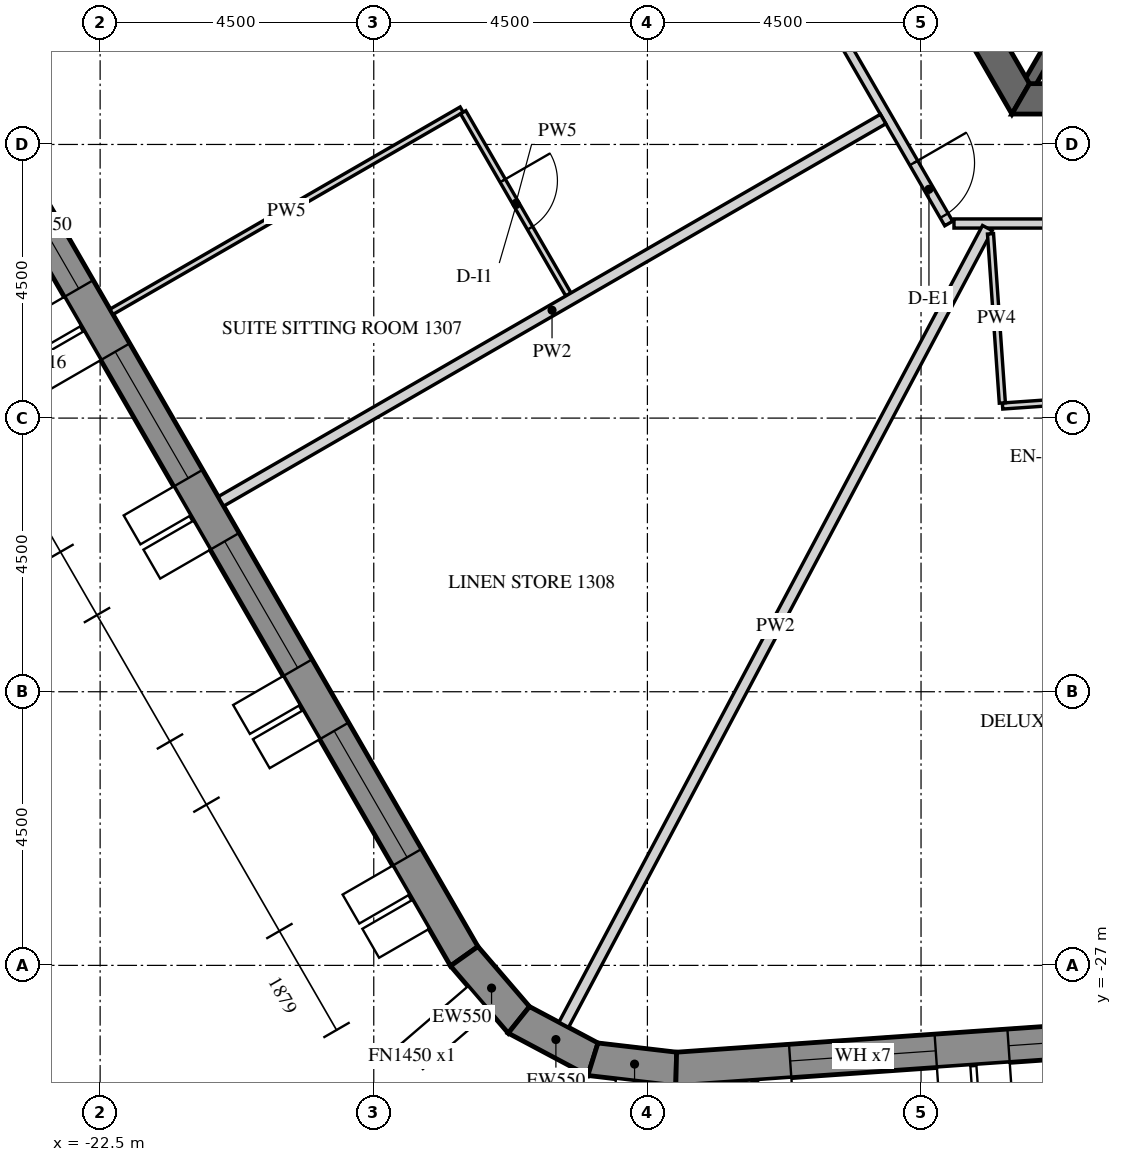
"""IFC4 building model, lengths in metres.
Left out: names, types, materials, properties, quantities, classifications, styles, units other than length and angle.
Written with IfcOpenShell. Run it as: python <this file> out.ifc"""

import sys

from ifc_helpers import new_model, si_unit, direction, frame, frame_2d, origin, place, context, subcontext, project, spatial, polyline, rectangle, outline, extrude, element, fill, save


model = new_model("IFC4")
c1 = context("Model", 3, precision=1e-05, world=origin(), true_north=direction((0.0, 1.0)))
c2 = subcontext(c1, "Body", "Model", "MODEL_VIEW")
j1 = project(units=[si_unit("LENGTHUNIT", "METRE"), si_unit("PLANEANGLEUNIT", "RADIAN")], contexts=[c1])
p1 = place(None, origin())
s1 = spatial("IfcSite", under=j1, at=p1, CompositionType="ELEMENT")
p2 = place(p1, origin())
s2 = spatial("IfcBuilding", under=s1, at=p2, CompositionType="ELEMENT")
p3 = place(p2, frame((0.0, 0.0, 176.1)))
s3 = spatial("IfcBuildingStorey", under=s2, at=p3, CompositionType="ELEMENT", Elevation=176.1)
p4 = place(p3, frame((-30.391, -2.811, -0.15), z_axis=(0.0, 0.0, 1.0), x_axis=(0.499998569178, -0.866026229868, 0.0)))
e1 = element("IfcWall", 1, at=p4, inside=s3, PredefinedType="SOLIDWALL", context=c2, shape_type="SweptSolid", body=[
    extrude(outline(polyline([(-0.022, -0.275), (27.783, -0.275), (27.732, 0.275), (0.022, 0.275), (-0.022, -0.275)])), origin(), (0.0, 0.0, 1.0), 3.9),
])
p5 = place(p4, frame((1.879, 0.0, 1.05)))
e2 = element("IfcOpeningElement", 2, at=p5, cuts=e1, PredefinedType="OPENING", context=c2, shape_type="SweptSolid", body=[
    extrude(rectangle(XDim=2.4, YDim=2.4, at=frame_2d((1.2, 1.2))), frame((0.0, 0.285, 0.0), z_axis=(0.0, -1.0, 0.0), x_axis=(1.0, 0.0, 0.0)), (0.0, 0.0, 1.0), 0.57),
])
p6 = place(p4, frame((5.479, 0.0, 1.05)))
e3 = element("IfcOpeningElement", 3, at=p6, cuts=e1, PredefinedType="OPENING", context=c2, shape_type="SweptSolid", body=[
    extrude(rectangle(XDim=2.4, YDim=2.4, at=frame_2d((1.2, 1.2))), frame((0.0, 0.285, 0.0), z_axis=(0.0, -1.0, 0.0), x_axis=(1.0, 0.0, 0.0)), (0.0, 0.0, 1.0), 0.57),
])
p7 = place(p4, frame((9.079, 0.0, 1.05)))
e4 = element("IfcOpeningElement", 4, at=p7, cuts=e1, PredefinedType="OPENING", context=c2, shape_type="SweptSolid", body=[
    extrude(rectangle(XDim=2.4, YDim=2.4, at=frame_2d((1.2, 1.2))), frame((0.0, 0.285, 0.0), z_axis=(0.0, -1.0, 0.0), x_axis=(1.0, 0.0, 0.0)), (0.0, 0.0, 1.0), 0.57),
])
p8 = place(p4, frame((12.679, 0.0, 1.05)))
e5 = element("IfcOpeningElement", 5, at=p8, cuts=e1, PredefinedType="OPENING", context=c2, shape_type="SweptSolid", body=[
    extrude(rectangle(XDim=2.4, YDim=2.4, at=frame_2d((1.2, 1.2))), frame((0.0, 0.285, 0.0), z_axis=(0.0, -1.0, 0.0), x_axis=(1.0, 0.0, 0.0)), (0.0, 0.0, 1.0), 0.57),
])
p9 = place(p4, frame((16.279, 0.0, 1.05)))
e6 = element("IfcOpeningElement", 6, at=p9, cuts=e1, PredefinedType="OPENING", context=c2, shape_type="SweptSolid", body=[
    extrude(rectangle(XDim=2.4, YDim=2.4, at=frame_2d((1.2, 1.2))), frame((0.0, 0.285, 0.0), z_axis=(0.0, -1.0, 0.0), x_axis=(1.0, 0.0, 0.0)), (0.0, 0.0, 1.0), 0.57),
])
p10 = place(p4, frame((19.879, 0.0, 1.05)))
e7 = element("IfcOpeningElement", 7, at=p10, cuts=e1, PredefinedType="OPENING", context=c2, shape_type="SweptSolid", body=[
    extrude(rectangle(XDim=2.4, YDim=2.4, at=frame_2d((1.2, 1.2))), frame((0.0, 0.285, 0.0), z_axis=(0.0, -1.0, 0.0), x_axis=(1.0, 0.0, 0.0)), (0.0, 0.0, 1.0), 0.57),
])
p11 = place(p4, frame((23.479, 0.0, 1.05)))
e8 = element("IfcOpeningElement", 8, at=p11, cuts=e1, PredefinedType="OPENING", context=c2, shape_type="SweptSolid", body=[
    extrude(rectangle(XDim=2.4, YDim=2.4, at=frame_2d((1.2, 1.2))), frame((0.0, 0.285, 0.0), z_axis=(0.0, -1.0, 0.0), x_axis=(1.0, 0.0, 0.0)), (0.0, 0.0, 1.0), 0.57),
])
p12 = place(p3, frame((-16.512, -26.85, -0.15), z_axis=(0.0, 0.0, 1.0), x_axis=(0.651621950847, -0.758543890078, 0.0)))
e9 = element("IfcWall", 9, at=p12, inside=s3, PredefinedType="SOLIDWALL", context=c2, shape_type="SweptSolid", body=[
    extrude(outline(polyline([(-0.026, -0.275), (1.431, -0.275), (1.327, 0.275), (0.026, 0.275), (-0.026, -0.275)])), origin(), (0.0, 0.0, 1.0), 3.9),
])
p13 = place(p3, frame((-15.614, -27.896, -0.15), z_axis=(0.0, 0.0, 1.0), x_axis=(0.882994189209, -0.469383917304, 0.0)))
e10 = element("IfcWall", 10, at=p13, inside=s3, PredefinedType="SOLIDWALL", context=c2, shape_type="SweptSolid", body=[
    extrude(outline(polyline([(-0.052, -0.275), (1.431, -0.275), (1.327, 0.275), (0.052, 0.275), (-0.052, -0.275)])), origin(), (0.0, 0.0, 1.0), 3.9),
])
p14 = place(p3, frame((-14.396, -28.543, -0.15), z_axis=(0.0, 0.0, 1.0), x_axis=(0.993232537394, -0.11614269956, 0.0)))
e11 = element("IfcWall", 11, at=p14, inside=s3, PredefinedType="SOLIDWALL", context=c2, shape_type="SweptSolid", body=[
    extrude(outline(polyline([(-0.052, -0.275), (1.405, -0.275), (1.353, 0.275), (0.052, 0.275), (-0.052, -0.275)])), origin(), (0.0, 0.0, 1.0), 3.9),
])
p15 = place(p3, frame((-13.026, -28.704, -0.15), z_axis=(0.0, 0.0, 1.0), x_axis=(0.99756406806, 0.069756219185, 0.0)))
e12 = element("IfcWall", 12, at=p15, inside=s3, PredefinedType="SOLIDWALL", context=c2, shape_type="SweptSolid", body=[
    extrude(outline(polyline([(-0.026, -0.275), (27.78, -0.275), (27.735, 0.275), (0.026, 0.275), (-0.026, -0.275)])), origin(), (0.0, 0.0, 1.0), 3.9),
])
p16 = place(p15, frame((1.879, 0.0, 1.05)))
e13 = element("IfcOpeningElement", 13, at=p16, cuts=e12, PredefinedType="OPENING", context=c2, shape_type="SweptSolid", body=[
    extrude(rectangle(XDim=2.4, YDim=2.4, at=frame_2d((1.2, 1.2))), frame((0.0, 0.285, 0.0), z_axis=(0.0, -1.0, 0.0), x_axis=(1.0, 0.0, 0.0)), (0.0, 0.0, 1.0), 0.57),
])
p17 = place(p15, frame((5.479, 0.0, 1.05)))
e14 = element("IfcOpeningElement", 14, at=p17, cuts=e12, PredefinedType="OPENING", context=c2, shape_type="SweptSolid", body=[
    extrude(rectangle(XDim=2.4, YDim=2.4, at=frame_2d((1.2, 1.2))), frame((0.0, 0.285, 0.0), z_axis=(0.0, -1.0, 0.0), x_axis=(1.0, 0.0, 0.0)), (0.0, 0.0, 1.0), 0.57),
])
p18 = place(p15, frame((9.079, 0.0, 1.05)))
e15 = element("IfcOpeningElement", 15, at=p18, cuts=e12, PredefinedType="OPENING", context=c2, shape_type="SweptSolid", body=[
    extrude(rectangle(XDim=2.4, YDim=2.4, at=frame_2d((1.2, 1.2))), frame((0.0, 0.285, 0.0), z_axis=(0.0, -1.0, 0.0), x_axis=(1.0, 0.0, 0.0)), (0.0, 0.0, 1.0), 0.57),
])
p19 = place(p15, frame((12.679, 0.0, 1.05)))
e16 = element("IfcOpeningElement", 16, at=p19, cuts=e12, PredefinedType="OPENING", context=c2, shape_type="SweptSolid", body=[
    extrude(rectangle(XDim=2.4, YDim=2.4, at=frame_2d((1.2, 1.2))), frame((0.0, 0.285, 0.0), z_axis=(0.0, -1.0, 0.0), x_axis=(1.0, 0.0, 0.0)), (0.0, 0.0, 1.0), 0.57),
])
p20 = place(p15, frame((16.279, 0.0, 1.05)))
e17 = element("IfcOpeningElement", 17, at=p20, cuts=e12, PredefinedType="OPENING", context=c2, shape_type="SweptSolid", body=[
    extrude(rectangle(XDim=2.4, YDim=2.4, at=frame_2d((1.2, 1.2))), frame((0.0, 0.285, 0.0), z_axis=(0.0, -1.0, 0.0), x_axis=(1.0, 0.0, 0.0)), (0.0, 0.0, 1.0), 0.57),
])
p21 = place(p15, frame((19.879, 0.0, 1.05)))
e18 = element("IfcOpeningElement", 18, at=p21, cuts=e12, PredefinedType="OPENING", context=c2, shape_type="SweptSolid", body=[
    extrude(rectangle(XDim=2.4, YDim=2.4, at=frame_2d((1.2, 1.2))), frame((0.0, 0.285, 0.0), z_axis=(0.0, -1.0, 0.0), x_axis=(1.0, 0.0, 0.0)), (0.0, 0.0, 1.0), 0.57),
])
p22 = place(p15, frame((23.479, 0.0, 1.05)))
e19 = element("IfcOpeningElement", 19, at=p22, cuts=e12, PredefinedType="OPENING", context=c2, shape_type="SweptSolid", body=[
    extrude(rectangle(XDim=2.4, YDim=2.4, at=frame_2d((1.2, 1.2))), frame((0.0, 0.285, 0.0), z_axis=(0.0, -1.0, 0.0), x_axis=(1.0, 0.0, 0.0)), (0.0, 0.0, 1.0), 0.57),
])
p23 = place(p3, frame((-14.722, 0.0, -0.15), z_axis=(0.0, 0.0, 1.0), x_axis=(0.50000571537, -0.866022103989, 0.0)))
e20 = element("IfcWall", 20, at=p23, inside=s3, PredefinedType="SHEAR", context=c2, shape_type="SweptSolid", body=[
    extrude(outline(polyline([(-0.144, -0.25), (14.867, -0.25), (14.578, 0.25), (0.144, 0.25), (-0.144, -0.25)])), origin(), (0.0, 0.0, 1.0), 3.9),
])
p24 = place(p23, frame((6.432, 0.0, 0.15)))
e21 = element("IfcOpeningElement", 21, at=p24, cuts=e20, PredefinedType="OPENING", context=c2, shape_type="SweptSolid", body=[
    extrude(rectangle(XDim=1.8, YDim=2.4, at=frame_2d((0.9, 1.2))), frame((0.0, 0.26, 0.0), z_axis=(0.0, -1.0, 0.0), x_axis=(1.0, 0.0, 0.0)), (0.0, 0.0, 1.0), 0.52),
])
p25 = place(p3, frame((-7.361, -12.75, -0.15), z_axis=(0.0, 0.0, 1.0), x_axis=(1.0, 0.0, 0.0)))
e22 = element("IfcWall", 22, at=p25, inside=s3, PredefinedType="SHEAR", context=c2, shape_type="SweptSolid", body=[
    extrude(outline(polyline([(-0.144, -0.25), (14.866, -0.25), (14.578, 0.25), (0.144, 0.25), (-0.144, -0.25)])), origin(), (0.0, 0.0, 1.0), 3.9),
])
p26 = place(p25, frame((6.761, 0.0, 0.15)))
e23 = element("IfcOpeningElement", 23, at=p26, cuts=e22, PredefinedType="OPENING", context=c2, shape_type="SweptSolid", body=[
    extrude(rectangle(XDim=1.2, YDim=2.4, at=frame_2d((0.6, 1.2))), frame((0.0, 0.26, 0.0), z_axis=(0.0, -1.0, 0.0), x_axis=(1.0, 0.0, 0.0)), (0.0, 0.0, 1.0), 0.52),
])
p27 = place(p3, frame((-5.773, -10.0, -0.15), z_axis=(0.0, 0.0, 1.0), x_axis=(-0.499995765644, -0.866027848477, 0.0)))
e24 = element("IfcWall", 24, at=p27, inside=s3, PredefinedType="SHEAR", context=c2, shape_type="SweptSolid", body=[
    extrude(rectangle(XDim=2.887, YDim=0.2, at=frame_2d((1.443, 0.0))), origin(), (0.0, 0.0, 1.0), 3.9),
])
p28 = place(p3, frame((-14.921, -3.757, 0.0), z_axis=(0.0, 0.0, 1.0), x_axis=(0.500001980452, -0.866024260367, 0.0)))
e25 = element("IfcWall", 25, at=p28, inside=s3, PredefinedType="PARTITIONING", context=c2, shape_type="SweptSolid", body=[
    extrude(rectangle(XDim=12.752, YDim=0.15, at=frame_2d((6.376, 0.0))), origin(), (0.0, 0.0, 1.0), 2.988),
])
p29 = place(p28, frame((6.225, 0.0, 0.0)))
e26 = element("IfcOpeningElement", 26, at=p29, cuts=e25, PredefinedType="OPENING", context=c2, shape_type="SweptSolid", body=[
    extrude(rectangle(XDim=1.0, YDim=2.1, at=frame_2d((0.5, 1.05))), frame((0.0, 0.085, 0.0), z_axis=(0.0, -1.0, 0.0), x_axis=(1.0, 0.0, 0.0)), (0.0, 0.0, 1.0), 0.17),
])
p30 = place(p28, frame((11.602, 0.0, 0.0)))
e27 = element("IfcOpeningElement", 27, at=p30, cuts=e25, PredefinedType="OPENING", context=c2, shape_type="SweptSolid", body=[
    extrude(rectangle(XDim=1.0, YDim=2.1, at=frame_2d((0.5, 1.05))), frame((0.0, 0.085, 0.0), z_axis=(0.0, -1.0, 0.0), x_axis=(1.0, 0.0, 0.0)), (0.0, 0.0, 1.0), 0.17),
])
p31 = place(p3, frame((-8.458, -14.8, 0.0), z_axis=(0.0, 0.0, 1.0), x_axis=(1.0, 0.0, 0.0)))
e28 = element("IfcWall", 28, at=p31, inside=s3, PredefinedType="PARTITIONING", context=c2, shape_type="SweptSolid", body=[
    extrude(rectangle(XDim=14.636, YDim=0.15, at=frame_2d((7.318, 0.0))), origin(), (0.0, 0.0, 1.0), 2.988),
])
p32 = place(p31, frame((4.375, 0.0, 0.0)))
e29 = element("IfcOpeningElement", 29, at=p32, cuts=e28, PredefinedType="OPENING", context=c2, shape_type="SweptSolid", body=[
    extrude(rectangle(XDim=1.0, YDim=2.1, at=frame_2d((0.5, 1.05))), frame((0.0, 0.085, 0.0), z_axis=(0.0, -1.0, 0.0), x_axis=(1.0, 0.0, 0.0)), (0.0, 0.0, 1.0), 0.17),
])
p33 = place(p31, frame((11.499, 0.0, 0.0)))
e30 = element("IfcOpeningElement", 30, at=p33, cuts=e28, PredefinedType="OPENING", context=c2, shape_type="SweptSolid", body=[
    extrude(rectangle(XDim=1.0, YDim=2.1, at=frame_2d((0.5, 1.05))), frame((0.0, 0.085, 0.0), z_axis=(0.0, -1.0, 0.0), x_axis=(1.0, 0.0, 0.0)), (0.0, 0.0, 1.0), 0.17),
])
p34 = place(p3, frame((-22.313, -16.252, 0.0), z_axis=(0.0, 0.0, 1.0), x_axis=(0.866027239912, 0.49999681972, 0.0)))
e31 = element("IfcWall", 31, at=p34, inside=s3, PredefinedType="PARTITIONING", context=c2, shape_type="SweptSolid", body=[
    extrude(rectangle(XDim=6.65, YDim=0.1, at=frame_2d((3.325, 0.0))), origin(), (0.0, 0.0, 1.0), 2.988),
])
p35 = place(p3, frame((-16.529, -12.97, 0.0), z_axis=(0.0, 0.0, 1.0), x_axis=(0.499978980201, -0.866037539231, 0.0)))
e32 = element("IfcWall", 32, at=p35, inside=s3, PredefinedType="PARTITIONING", context=c2, shape_type="SweptSolid", body=[
    extrude(rectangle(XDim=3.46, YDim=0.1, at=frame_2d((1.73, 0.0))), origin(), (0.0, 0.0, 1.0), 2.988),
])
p36 = place(p35, frame((1.3, 0.0, 0.0)))
e33 = element("IfcOpeningElement", 33, at=p36, cuts=e32, PredefinedType="OPENING", context=c2, shape_type="SweptSolid", body=[
    extrude(rectangle(XDim=0.9, YDim=2.1, at=frame_2d((0.45, 1.05))), frame((0.0, 0.06, 0.0), z_axis=(0.0, -1.0, 0.0), x_axis=(1.0, 0.0, 0.0)), (0.0, 0.0, 1.0), 0.12),
])
p37 = place(p3, frame((-20.513, -19.37, 0.0), z_axis=(0.0, 0.0, 1.0), x_axis=(0.866019402111, 0.500010395058, 0.0)))
e34 = element("IfcWall", 34, at=p37, inside=s3, PredefinedType="PARTITIONING", context=c2, shape_type="SweptSolid", body=[
    extrude(rectangle(XDim=12.575, YDim=0.18, at=frame_2d((6.288, 0.0))), origin(), (0.0, 0.0, 1.0), 2.988),
])
p38 = place(p3, frame((-14.876, -27.977, 0.0), z_axis=(0.0, 0.0, 1.0), x_axis=(0.469475175214, 0.882945672088, 0.0)))
e35 = element("IfcWall", 35, at=p38, inside=s3, PredefinedType="PARTITIONING", context=c2, shape_type="SweptSolid", body=[
    extrude(rectangle(XDim=14.839, YDim=0.18, at=frame_2d((7.419, 0.0))), origin(), (0.0, 0.0, 1.0), 2.988),
])
p39 = place(p3, frame((-5.116, -17.623, 0.0), z_axis=(0.0, 0.0, 1.0), x_axis=(-0.997561167558, -0.069797686069, 0.0)))
e36 = element("IfcWall", 36, at=p39, inside=s3, PredefinedType="PARTITIONING", context=c2, shape_type="SweptSolid", body=[
    extrude(rectangle(XDim=2.55, YDim=0.1, at=frame_2d((1.275, 0.0))), origin(), (0.0, 0.0, 1.0), 2.988),
])
p40 = place(p3, frame((-7.663, -17.751, 0.0), z_axis=(0.0, 0.0, 1.0), x_axis=(-0.069778595312, 0.997562503123, 0.0)))
e37 = element("IfcWall", 37, at=p40, inside=s3, PredefinedType="PARTITIONING", context=c2, shape_type="SweptSolid", body=[
    extrude(rectangle(XDim=2.789, YDim=0.1, at=frame_2d((1.394, 0.0))), origin(), (0.0, 0.0, 1.0), 2.988),
])
p41 = place(p8, frame((0.0, 0.205, 0.0)))
e38 = element("IfcWindow", 38, at=p41, inside=s3, PartitioningType="DOUBLE_PANEL_VERTICAL", PredefinedType="WINDOW", context=c2, shape_type="SweptSolid", body=[
    extrude(rectangle(XDim=2.4, YDim=2.4, at=frame_2d((1.2, 1.2))), frame((0.0, 0.03, 0.0), z_axis=(0.0, -1.0, 0.0), x_axis=(1.0, 0.0, 0.0)), (0.0, 0.0, 1.0), 0.06),
])
fill(e5, e38)
p42 = place(p9, frame((0.0, 0.205, 0.0)))
e39 = element("IfcWindow", 39, at=p42, inside=s3, PartitioningType="DOUBLE_PANEL_VERTICAL", PredefinedType="WINDOW", context=c2, shape_type="SweptSolid", body=[
    extrude(rectangle(XDim=2.4, YDim=2.4, at=frame_2d((1.2, 1.2))), frame((0.0, 0.03, 0.0), z_axis=(0.0, -1.0, 0.0), x_axis=(1.0, 0.0, 0.0)), (0.0, 0.0, 1.0), 0.06),
])
fill(e6, e39)
p43 = place(p10, frame((0.0, 0.205, 0.0)))
e40 = element("IfcWindow", 40, at=p43, inside=s3, PartitioningType="DOUBLE_PANEL_VERTICAL", PredefinedType="WINDOW", context=c2, shape_type="SweptSolid", body=[
    extrude(rectangle(XDim=2.4, YDim=2.4, at=frame_2d((1.2, 1.2))), frame((0.0, 0.03, 0.0), z_axis=(0.0, -1.0, 0.0), x_axis=(1.0, 0.0, 0.0)), (0.0, 0.0, 1.0), 0.06),
])
fill(e7, e40)
p44 = place(p11, frame((0.0, 0.205, 0.0)))
e41 = element("IfcWindow", 41, at=p44, inside=s3, PartitioningType="DOUBLE_PANEL_VERTICAL", PredefinedType="WINDOW", context=c2, shape_type="SweptSolid", body=[
    extrude(rectangle(XDim=2.4, YDim=2.4, at=frame_2d((1.2, 1.2))), frame((0.0, 0.03, 0.0), z_axis=(0.0, -1.0, 0.0), x_axis=(1.0, 0.0, 0.0)), (0.0, 0.0, 1.0), 0.06),
])
fill(e8, e41)
p45 = place(p16, frame((0.0, 0.205, 0.0)))
e42 = element("IfcWindow", 42, at=p45, inside=s3, PartitioningType="DOUBLE_PANEL_VERTICAL", PredefinedType="WINDOW", context=c2, shape_type="SweptSolid", body=[
    extrude(rectangle(XDim=2.4, YDim=2.4, at=frame_2d((1.2, 1.2))), frame((0.0, 0.03, 0.0), z_axis=(0.0, -1.0, 0.0), x_axis=(1.0, 0.0, 0.0)), (0.0, 0.0, 1.0), 0.06),
])
fill(e13, e42)
p46 = place(p17, frame((0.0, 0.205, 0.0)))
e43 = element("IfcWindow", 43, at=p46, inside=s3, PartitioningType="DOUBLE_PANEL_VERTICAL", PredefinedType="WINDOW", context=c2, shape_type="SweptSolid", body=[
    extrude(rectangle(XDim=2.4, YDim=2.4, at=frame_2d((1.2, 1.2))), frame((0.0, 0.03, 0.0), z_axis=(0.0, -1.0, 0.0), x_axis=(1.0, 0.0, 0.0)), (0.0, 0.0, 1.0), 0.06),
])
fill(e14, e43)
p47 = place(p36, origin())
e44 = element("IfcDoor", 44, at=p47, inside=s3, OperationType="SINGLE_SWING_LEFT", PredefinedType="DOOR", context=c2, shape_type="SweptSolid", body=[
    extrude(rectangle(XDim=0.9, YDim=2.1, at=frame_2d((0.45, 1.05))), frame((0.0, 0.025, 0.0), z_axis=(0.0, -1.0, 0.0), x_axis=(1.0, 0.0, 0.0)), (0.0, 0.0, 1.0), 0.05),
])
fill(e33, e44)
p48 = place(p30, origin())
e45 = element("IfcDoor", 45, at=p48, inside=s3, OperationType="SINGLE_SWING_LEFT", PredefinedType="DOOR", context=c2, shape_type="SweptSolid", body=[
    extrude(rectangle(XDim=1.0, YDim=2.1, at=frame_2d((0.5, 1.05))), frame((0.0, 0.025, 0.0), z_axis=(0.0, -1.0, 0.0), x_axis=(1.0, 0.0, 0.0)), (0.0, 0.0, 1.0), 0.05),
])
fill(e27, e45)
save(model, sys.argv[1])
